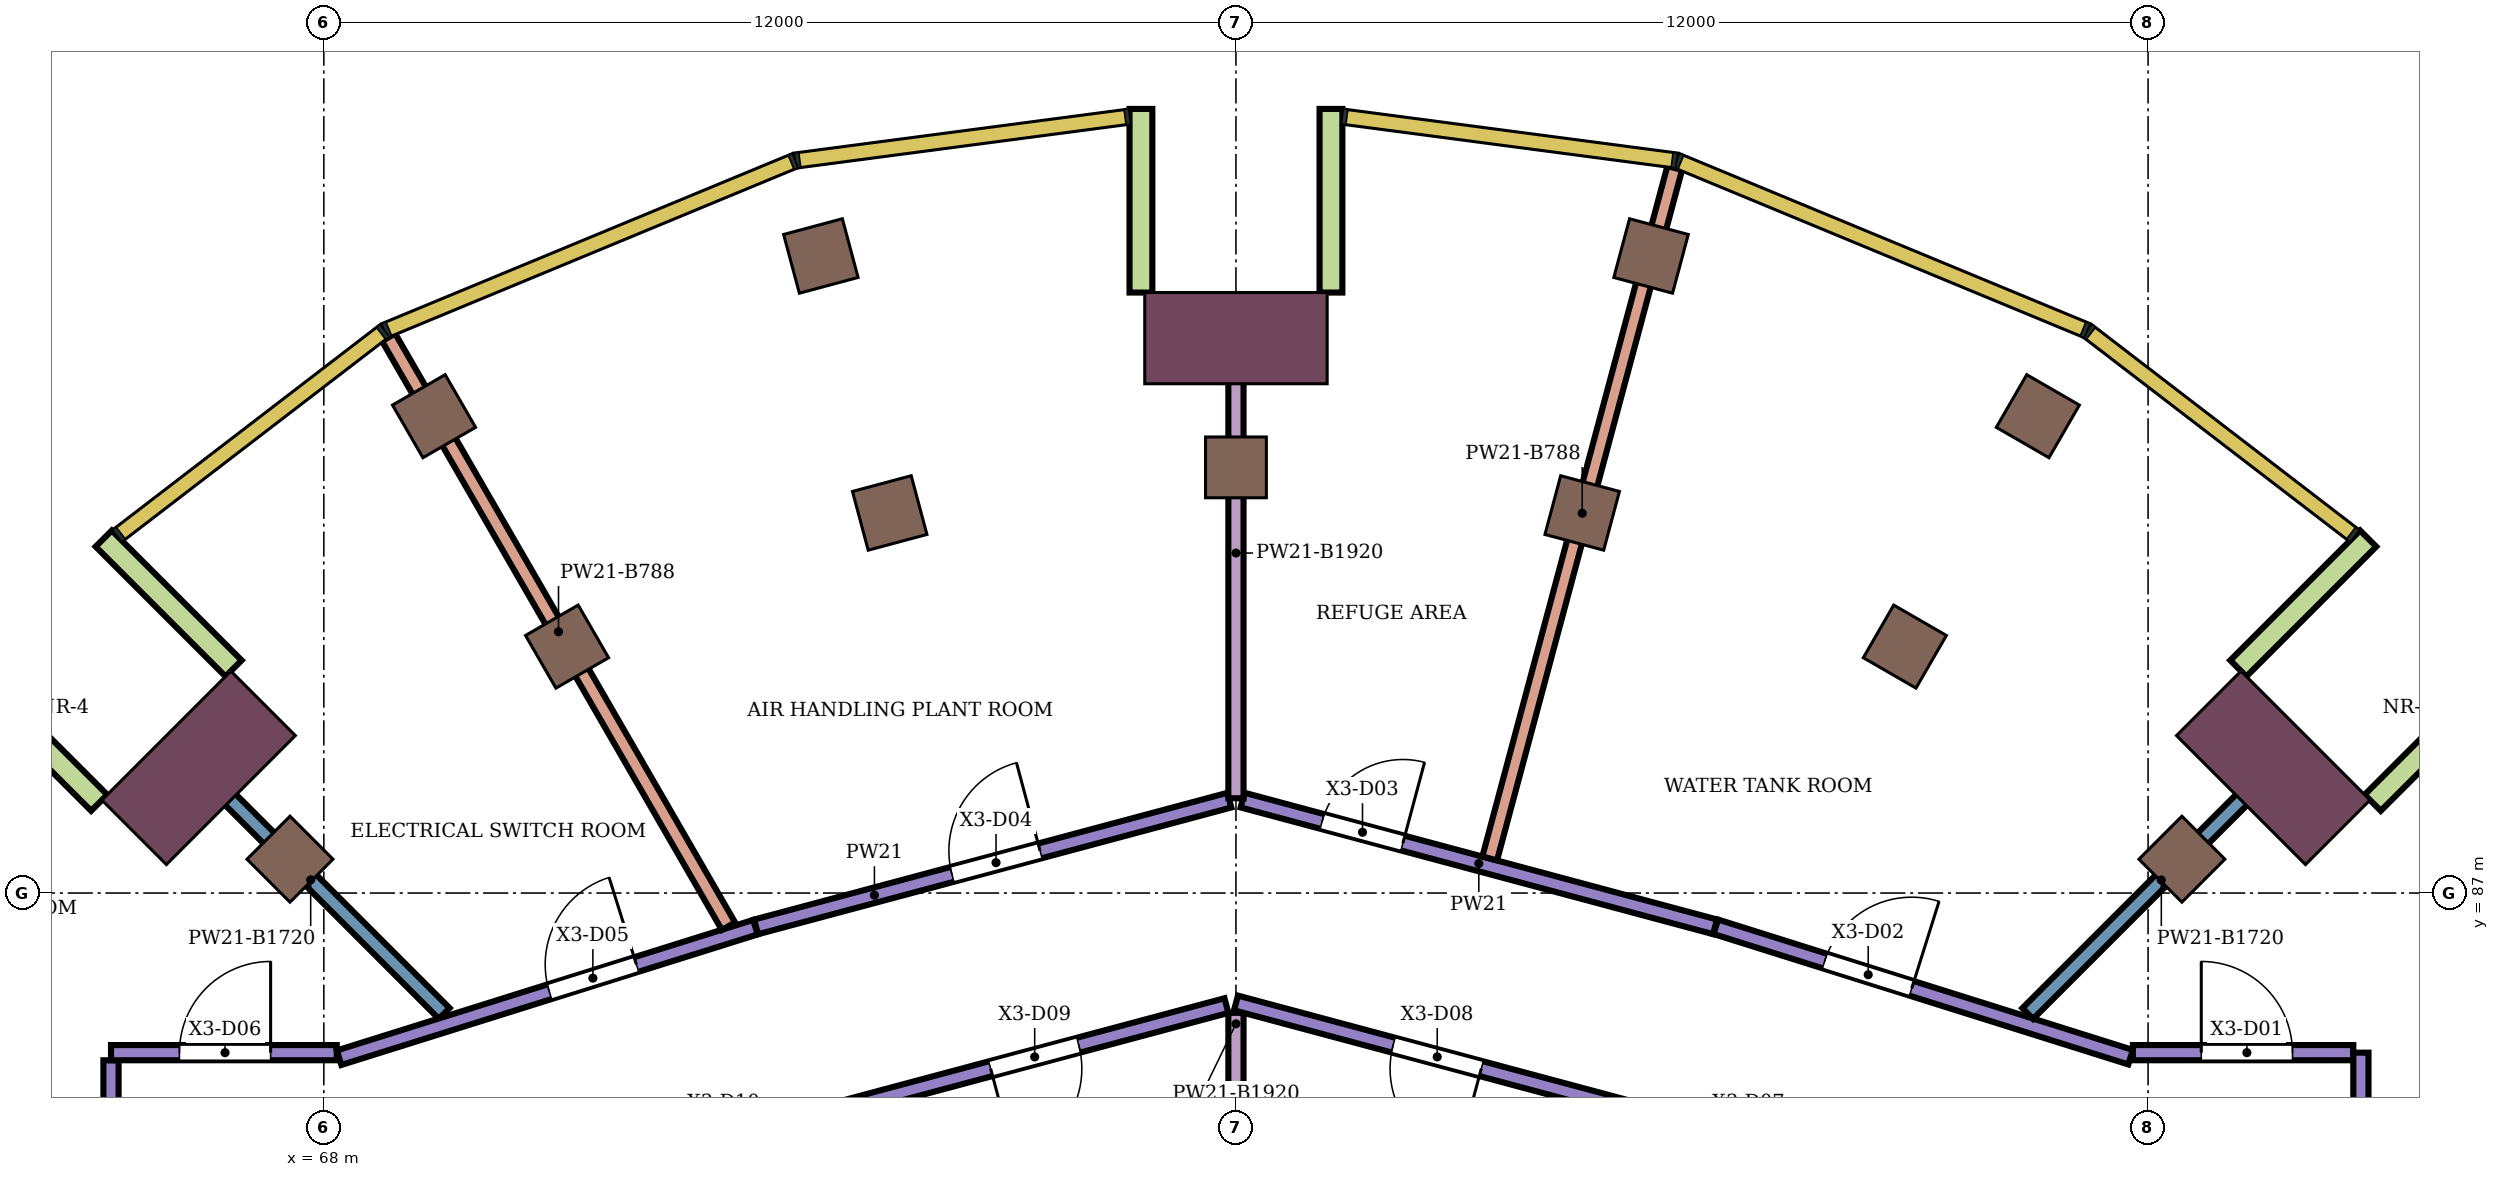
"""IFC4 building model, lengths in metres.
Left out: names, types, materials, properties, quantities, classifications, styles, units other than length and angle.
Written with IfcOpenShell. Run it as: python <this file> out.ifc"""

import sys

from ifc_helpers import new_model, si_unit, direction, frame, frame_2d, origin, origin_2d, place, context, subcontext, project, spatial, rectangle, extrude, element, fill, save


model = new_model("IFC4")
c1 = context("Model", 3, precision=1e-05, world=origin(), true_north=direction((0.0, 1.0)))
c2 = subcontext(c1, "Body", "Model", "MODEL_VIEW")
j1 = project(units=[si_unit("LENGTHUNIT", "METRE"), si_unit("PLANEANGLEUNIT", "RADIAN")], contexts=[c1])
p1 = place(None, origin())
s1 = spatial("IfcSite", under=j1, at=p1, CompositionType="ELEMENT")
p2 = place(p1, origin())
s2 = spatial("IfcBuilding", under=s1, at=p2, CompositionType="ELEMENT")
p3 = place(p2, frame((0.0, 0.0, 309.3)))
s3 = spatial("IfcBuildingStorey", under=s2, at=p3, CompositionType="ELEMENT", Elevation=309.3)
for number, where, z_axis, x_axis in (
    (1, (90.55, 93.273, 0.0), (0.0, 0.0, 1.0), (0.5, 0.866, 0.0)),
    (2, (85.461, 95.381, 0.0), (0.0, 0.0, 1.0), (0.259, 0.966, 0.0)),
    (3, (74.539, 95.381, 0.0), (0.0, 0.0, 1.0), (-0.259, 0.966, 0.0)),
    (4, (69.45, 93.273, 0.0), (0.0, 0.0, 1.0), (-0.5, 0.866, 0.0)),
    (5, (92.445, 87.445, 0.0), (0.0, 0.0, 1.0), (0.707, 0.707, 0.0)),
    (6, (88.8, 90.242, 0.0), (0.0, 0.0, 1.0), (0.5, 0.866, 0.0)),
    (7, (84.555, 92.0, 0.0), (0.0, 0.0, 1.0), (0.259, 0.966, 0.0)),
    (8, (80.0, 92.6, 0.0), (0.0, 0.0, 1.0), (0.0, 1.0, 0.0)),
    (9, (75.445, 92.0, 0.0), (0.0, 0.0, 1.0), (-0.259, 0.966, 0.0)),
    (10, (71.2, 90.242, 0.0), (0.0, 0.0, 1.0), (-0.5, 0.866, 0.0)),
    (11, (67.555, 87.445, 0.0), (0.0, 0.0, 1.0), (-0.707, 0.707, 0.0)),
):
    element("IfcColumn", number, at=place(p3, frame(where, z_axis=z_axis, x_axis=x_axis)), inside=s3, PredefinedType="COLUMN", context=c2, shape_type="SweptSolid", body=[
        extrude(rectangle(XDim=0.8, YDim=0.8, at=origin_2d()), origin(), (0.0, 0.0, 1.0), 5.6),
    ])
for number, where, z_axis, x_axis in (
    (12, (93.647, 88.647, 0.0), (0.0, 0.0, 1.0), (0.707, 0.707, 0.0)),
    (13, (80.0, 94.3, 0.0), (0.0, 0.0, 1.0), (0.0, 1.0, 0.0)),
    (14, (66.353, 88.647, 0.0), (0.0, 0.0, 1.0), (-0.707, 0.707, 0.0)),
):
    element("IfcColumn", number, at=place(p3, frame(where, z_axis=z_axis, x_axis=x_axis)), inside=s3, PredefinedType="COLUMN", context=c2, shape_type="SweptSolid", body=[
        extrude(rectangle(XDim=1.2, YDim=2.4, at=origin_2d()), origin(), (0.0, 0.0, 1.0), 5.6),
    ])
for number, where, z_axis, x_axis in (
    (15, (94.955, 88.188, 0.0), (0.0, 0.0, 1.0), (0.707, 0.707, 0.0)),
    (16, (93.188, 89.955, 0.0), (0.0, 0.0, 1.0), (0.707, 0.707, 0.0)),
    (17, (81.25, 94.9, 0.0), (0.0, 0.0, 1.0), (0.0, 1.0, 0.0)),
    (18, (78.75, 94.9, 0.0), (0.0, 0.0, 1.0), (0.0, 1.0, 0.0)),
    (19, (66.812, 89.955, 0.0), (0.0, 0.0, 1.0), (-0.707, 0.707, 0.0)),
    (20, (65.045, 88.188, 0.0), (0.0, 0.0, 1.0), (-0.707, 0.707, 0.0)),
):
    element("IfcWall", number, at=place(p3, frame(where, z_axis=z_axis, x_axis=x_axis)), inside=s3, PredefinedType="NOTDEFINED", context=c2, shape_type="SweptSolid", body=[
        extrude(rectangle(XDim=2.416, YDim=0.3, at=frame_2d((1.208, 0.0))), origin(), (0.0, 0.0, 1.0), 5.6),
    ])
p4 = place(p3, frame((65.2, 83.401, 0.0), z_axis=(0.0, 0.0, 1.0), x_axis=(0.0, 1.0, 0.0)))
e21 = element("IfcWall", 21, at=p4, inside=s3, PredefinedType="PARTITIONING", context=c2, shape_type="SweptSolid", body=[
    extrude(rectangle(XDim=1.399, YDim=0.2, at=frame_2d((0.7, 0.0))), origin(), (0.0, 0.0, 1.0), 5.15),
])
p5 = place(p3, frame((65.2, 84.9, 0.0), z_axis=(0.0, 0.0, 1.0), x_axis=(1.0, 0.0, 0.0)))
e22 = element("IfcWall", 22, at=p5, inside=s3, PredefinedType="PARTITIONING", context=c2, shape_type="SweptSolid", body=[
    extrude(rectangle(XDim=2.97, YDim=0.2, at=frame_2d((1.485, 0.0))), origin(), (0.0, 0.0, 1.0), 5.15),
])
p6 = place(p5, frame((0.9, 0.0, 0.0)))
e23 = element("IfcOpeningElement", 23, at=p6, cuts=e22, PredefinedType="OPENING", context=c2, shape_type="SweptSolid", body=[
    extrude(rectangle(XDim=1.2, YDim=2.4, at=frame_2d((0.6, 1.2))), frame((0.0, 0.11, 0.0), z_axis=(0.0, -1.0, 0.0), x_axis=(1.0, 0.0, 0.0)), (0.0, 0.0, 1.0), 0.22),
])
p7 = place(p3, frame((66.07, 88.93, 0.0), z_axis=(0.0, 0.0, 1.0), x_axis=(0.707008510494, -0.707205038224, 0.0)))
e24 = element("IfcWall", 24, at=p7, inside=s3, PredefinedType="PARTITIONING", context=c2, shape_type="SweptSolid", body=[
    extrude(rectangle(XDim=4.969, YDim=0.2, at=frame_2d((2.484, 0.0))), origin(), (0.0, 0.0, 1.0), 3.88),
])
p8 = place(p3, frame((68.201, 84.833, 0.0), z_axis=(0.0, 0.0, 1.0), x_axis=(0.95420102455, 0.299166182492, 0.0)))
e25 = element("IfcWall", 25, at=p8, inside=s3, PredefinedType="PARTITIONING", context=c2, shape_type="SweptSolid", body=[
    extrude(rectangle(XDim=5.74, YDim=0.2, at=frame_2d((2.87, 0.0))), origin(), (0.0, 0.0, 1.0), 5.15),
])
p9 = place(p8, frame((2.899, 0.0, 0.0)))
e26 = element("IfcOpeningElement", 26, at=p9, cuts=e25, PredefinedType="OPENING", context=c2, shape_type="SweptSolid", body=[
    extrude(rectangle(XDim=1.2, YDim=2.4, at=frame_2d((0.6, 1.2))), frame((0.0, 0.11, 0.0), z_axis=(0.0, -1.0, 0.0), x_axis=(1.0, 0.0, 0.0)), (0.0, 0.0, 1.0), 0.22),
])
p10 = place(p3, frame((68.852, 94.311, 0.0), z_axis=(0.0, 0.0, 1.0), x_axis=(0.499940606313, -0.86605969203, 0.0)))
e27 = element("IfcWall", 27, at=p10, inside=s3, PredefinedType="PARTITIONING", context=c2, shape_type="SweptSolid", body=[
    extrude(rectangle(XDim=8.945, YDim=0.2, at=frame_2d((4.472, 0.0))), origin(), (0.0, 0.0, 1.0), 4.812),
])
p11 = place(p3, frame((73.687, 86.554, 0.0), z_axis=(0.0, 0.0, 1.0), x_axis=(0.96595903825, 0.258695064551, 0.0)))
e28 = element("IfcWall", 28, at=p11, inside=s3, PredefinedType="PARTITIONING", context=c2, shape_type="SweptSolid", body=[
    extrude(rectangle(XDim=6.446, YDim=0.2, at=frame_2d((3.223, 0.0))), origin(), (0.0, 0.0, 1.0), 5.15),
])
p12 = place(p11, frame((2.668, 0.0, 0.0)))
e29 = element("IfcOpeningElement", 29, at=p12, cuts=e28, PredefinedType="OPENING", context=c2, shape_type="SweptSolid", body=[
    extrude(rectangle(XDim=1.2, YDim=2.4, at=frame_2d((0.6, 1.2))), frame((0.0, 0.11, 0.0), z_axis=(0.0, -1.0, 0.0), x_axis=(1.0, 0.0, 0.0)), (0.0, 0.0, 1.0), 0.22),
])
p13 = place(p3, frame((74.413, 84.057, 0.0), z_axis=(0.0, 0.0, 1.0), x_axis=(0.965972135939, 0.258646153246, 0.0)))
e30 = element("IfcWall", 30, at=p13, inside=s3, PredefinedType="PARTITIONING", context=c2, shape_type="SweptSolid", body=[
    extrude(rectangle(XDim=5.654, YDim=0.2, at=frame_2d((2.827, 0.0))), origin(), (0.0, 0.0, 1.0), 5.15),
])
p14 = place(p13, frame((2.443, 0.0, 0.0)))
e31 = element("IfcOpeningElement", 31, at=p14, cuts=e30, PredefinedType="OPENING", context=c2, shape_type="SweptSolid", body=[
    extrude(rectangle(XDim=1.2, YDim=2.4, at=frame_2d((0.6, 1.2))), frame((0.0, 0.11, 0.0), z_axis=(0.0, -1.0, 0.0), x_axis=(1.0, 0.0, 0.0)), (0.0, 0.0, 1.0), 0.22),
])
p15 = place(p3, frame((80.0, 82.699, 0.0), z_axis=(0.0, 0.0, 1.0), x_axis=(0.0, 1.0, 0.0)))
e32 = element("IfcWall", 32, at=p15, inside=s3, PredefinedType="PARTITIONING", context=c2, shape_type="SweptSolid", body=[
    extrude(rectangle(XDim=2.725, YDim=0.2, at=frame_2d((1.363, 0.0))), origin(), (0.0, 0.0, 1.0), 3.68),
])
p16 = place(p3, frame((80.0, 85.554, 0.0), z_axis=(0.0, 0.0, 1.0), x_axis=(0.965928989968, -0.258807237802, 0.0)))
e33 = element("IfcWall", 33, at=p16, inside=s3, PredefinedType="PARTITIONING", context=c2, shape_type="SweptSolid", body=[
    extrude(rectangle(XDim=5.774, YDim=0.2, at=frame_2d((2.887, 0.0))), origin(), (0.0, 0.0, 1.0), 5.15),
])
p17 = place(p16, frame((2.141, 0.0, 0.0)))
e34 = element("IfcOpeningElement", 34, at=p17, cuts=e33, PredefinedType="OPENING", context=c2, shape_type="SweptSolid", body=[
    extrude(rectangle(XDim=1.2, YDim=2.4, at=frame_2d((0.6, 1.2))), frame((0.0, 0.11, 0.0), z_axis=(0.0, -1.0, 0.0), x_axis=(1.0, 0.0, 0.0)), (0.0, 0.0, 1.0), 0.22),
])
p18 = place(p3, frame((80.087, 88.223, 0.0), z_axis=(0.0, 0.0, 1.0), x_axis=(0.965861823169, -0.25905778997, 0.0)))
e35 = element("IfcWall", 35, at=p18, inside=s3, PredefinedType="PARTITIONING", context=c2, shape_type="SweptSolid", body=[
    extrude(rectangle(XDim=6.436, YDim=0.2, at=frame_2d((3.218, 0.0))), origin(), (0.0, 0.0, 1.0), 5.15),
])
p19 = place(p18, frame((1.084, 0.0, 0.0)))
e36 = element("IfcOpeningElement", 36, at=p19, cuts=e35, PredefinedType="OPENING", context=c2, shape_type="SweptSolid", body=[
    extrude(rectangle(XDim=1.1, YDim=2.1, at=frame_2d((0.55, 1.05))), frame((0.0, 0.11, 0.0), z_axis=(0.0, -1.0, 0.0), x_axis=(1.0, 0.0, 0.0)), (0.0, 0.0, 1.0), 0.22),
])
p20 = place(p3, frame((80.0, 88.247, 0.0), z_axis=(0.0, 0.0, 1.0), x_axis=(0.0, 1.0, 0.0)))
e37 = element("IfcWall", 37, at=p20, inside=s3, PredefinedType="PARTITIONING", context=c2, shape_type="SweptSolid", body=[
    extrude(rectangle(XDim=6.452, YDim=0.2, at=frame_2d((3.226, 0.0))), origin(), (0.0, 0.0, 1.0), 3.68),
])
p21 = place(p3, frame((83.338, 87.455, 0.0), z_axis=(0.0, 0.0, 1.0), x_axis=(0.258903493159, 0.965903194544, 0.0)))
e38 = element("IfcWall", 38, at=p21, inside=s3, PredefinedType="PARTITIONING", context=c2, shape_type="SweptSolid", body=[
    extrude(rectangle(XDim=9.403, YDim=0.2, at=frame_2d((4.702, 0.0))), origin(), (0.0, 0.0, 1.0), 4.812),
])
p22 = place(p3, frame((86.313, 86.556, 0.0), z_axis=(0.0, 0.0, 1.0), x_axis=(0.95397278515, -0.299893189641, 0.0)))
e39 = element("IfcWall", 39, at=p22, inside=s3, PredefinedType="PARTITIONING", context=c2, shape_type="SweptSolid", body=[
    extrude(rectangle(XDim=5.72, YDim=0.2, at=frame_2d((2.86, 0.0))), origin(), (0.0, 0.0, 1.0), 5.15),
])
p23 = place(p22, frame((1.501, 0.0, 0.0)))
e40 = element("IfcOpeningElement", 40, at=p23, cuts=e39, PredefinedType="OPENING", context=c2, shape_type="SweptSolid", body=[
    extrude(rectangle(XDim=1.2, YDim=2.4, at=frame_2d((0.6, 1.2))), frame((0.0, 0.11, 0.0), z_axis=(0.0, -1.0, 0.0), x_axis=(1.0, 0.0, 0.0)), (0.0, 0.0, 1.0), 0.22),
])
p24 = place(p3, frame((90.417, 85.414, 0.0), z_axis=(0.0, 0.0, 1.0), x_axis=(0.707205024573, 0.707008524149, 0.0)))
e41 = element("IfcWall", 41, at=p24, inside=s3, PredefinedType="PARTITIONING", context=c2, shape_type="SweptSolid", body=[
    extrude(rectangle(XDim=4.97, YDim=0.2, at=frame_2d((2.485, 0.0))), origin(), (0.0, 0.0, 1.0), 3.88),
])
p25 = place(p3, frame((91.8, 84.9, 0.0), z_axis=(0.0, 0.0, 1.0), x_axis=(1.0, 0.0, 0.0)))
e42 = element("IfcWall", 42, at=p25, inside=s3, PredefinedType="PARTITIONING", context=c2, shape_type="SweptSolid", body=[
    extrude(rectangle(XDim=2.9, YDim=0.2, at=frame_2d((1.45, 0.0))), origin(), (0.0, 0.0, 1.0), 5.15),
])
p26 = place(p25, frame((0.9, 0.0, 0.0)))
e43 = element("IfcOpeningElement", 43, at=p26, cuts=e42, PredefinedType="OPENING", context=c2, shape_type="SweptSolid", body=[
    extrude(rectangle(XDim=1.2, YDim=2.4, at=frame_2d((0.6, 1.2))), frame((0.0, 0.11, 0.0), z_axis=(0.0, -1.0, 0.0), x_axis=(1.0, 0.0, 0.0)), (0.0, 0.0, 1.0), 0.22),
])
p27 = place(p3, frame((94.8, 83.401, 0.0), z_axis=(0.0, 0.0, 1.0), x_axis=(0.0, 1.0, 0.0)))
e44 = element("IfcWall", 44, at=p27, inside=s3, PredefinedType="PARTITIONING", context=c2, shape_type="SweptSolid", body=[
    extrude(rectangle(XDim=1.499, YDim=0.2, at=frame_2d((0.75, 0.0))), origin(), (0.0, 0.0, 1.0), 5.15),
])
p28 = place(p26, origin())
e45 = element("IfcDoor", 45, at=p28, inside=s3, OperationType="SINGLE_SWING_LEFT", PredefinedType="DOOR", context=c2, shape_type="SweptSolid", body=[
    extrude(rectangle(XDim=1.2, YDim=2.4, at=frame_2d((0.6, 1.2))), frame((0.0, 0.025, 0.0), z_axis=(0.0, -1.0, 0.0), x_axis=(1.0, 0.0, 0.0)), (0.0, 0.0, 1.0), 0.05),
])
fill(e43, e45)
p29 = place(p23, origin())
e46 = element("IfcDoor", 46, at=p29, inside=s3, OperationType="SINGLE_SWING_RIGHT", PredefinedType="DOOR", context=c2, shape_type="SweptSolid", body=[
    extrude(rectangle(XDim=1.2, YDim=2.4, at=frame_2d((0.6, 1.2))), frame((0.0, 0.025, 0.0), z_axis=(0.0, -1.0, 0.0), x_axis=(1.0, 0.0, 0.0)), (0.0, 0.0, 1.0), 0.05),
])
fill(e40, e46)
p30 = place(p19, origin())
e47 = element("IfcDoor", 47, at=p30, inside=s3, OperationType="SINGLE_SWING_RIGHT", PredefinedType="DOOR", context=c2, shape_type="SweptSolid", body=[
    extrude(rectangle(XDim=1.1, YDim=2.1, at=frame_2d((0.55, 1.05))), frame((0.0, 0.025, 0.0), z_axis=(0.0, -1.0, 0.0), x_axis=(1.0, 0.0, 0.0)), (0.0, 0.0, 1.0), 0.05),
])
fill(e36, e47)
p31 = place(p12, origin())
e48 = element("IfcDoor", 48, at=p31, inside=s3, OperationType="SINGLE_SWING_RIGHT", PredefinedType="DOOR", context=c2, shape_type="SweptSolid", body=[
    extrude(rectangle(XDim=1.2, YDim=2.4, at=frame_2d((0.6, 1.2))), frame((0.0, 0.025, 0.0), z_axis=(0.0, -1.0, 0.0), x_axis=(1.0, 0.0, 0.0)), (0.0, 0.0, 1.0), 0.05),
])
fill(e29, e48)
p32 = place(p9, origin())
e49 = element("IfcDoor", 49, at=p32, inside=s3, OperationType="SINGLE_SWING_RIGHT", PredefinedType="DOOR", context=c2, shape_type="SweptSolid", body=[
    extrude(rectangle(XDim=1.2, YDim=2.4, at=frame_2d((0.6, 1.2))), frame((0.0, 0.025, 0.0), z_axis=(0.0, -1.0, 0.0), x_axis=(1.0, 0.0, 0.0)), (0.0, 0.0, 1.0), 0.05),
])
fill(e26, e49)
p33 = place(p6, origin())
e50 = element("IfcDoor", 50, at=p33, inside=s3, OperationType="SINGLE_SWING_RIGHT", PredefinedType="DOOR", context=c2, shape_type="SweptSolid", body=[
    extrude(rectangle(XDim=1.2, YDim=2.4, at=frame_2d((0.6, 1.2))), frame((0.0, 0.025, 0.0), z_axis=(0.0, -1.0, 0.0), x_axis=(1.0, 0.0, 0.0)), (0.0, 0.0, 1.0), 0.05),
])
fill(e23, e50)
p34 = place(p17, frame((1.2, 0.0, 0.0), z_axis=(0.0, 0.0, 1.0), x_axis=(-1.0, 0.0, 0.0)))
e51 = element("IfcDoor", 51, at=p34, inside=s3, OperationType="SINGLE_SWING_LEFT", PredefinedType="DOOR", context=c2, shape_type="SweptSolid", body=[
    extrude(rectangle(XDim=1.2, YDim=2.4, at=frame_2d((0.6, 1.2))), frame((0.0, 0.025, 0.0), z_axis=(0.0, -1.0, 0.0), x_axis=(1.0, 0.0, 0.0)), (0.0, 0.0, 1.0), 0.05),
])
fill(e34, e51)
p35 = place(p14, frame((1.2, 0.0, 0.0), z_axis=(0.0, 0.0, 1.0), x_axis=(-1.0, 0.0, 0.0)))
e52 = element("IfcDoor", 52, at=p35, inside=s3, OperationType="SINGLE_SWING_RIGHT", PredefinedType="DOOR", context=c2, shape_type="SweptSolid", body=[
    extrude(rectangle(XDim=1.2, YDim=2.4, at=frame_2d((0.6, 1.2))), frame((0.0, 0.025, 0.0), z_axis=(0.0, -1.0, 0.0), x_axis=(1.0, 0.0, 0.0)), (0.0, 0.0, 1.0), 0.05),
])
fill(e31, e52)
save(model, sys.argv[1])
